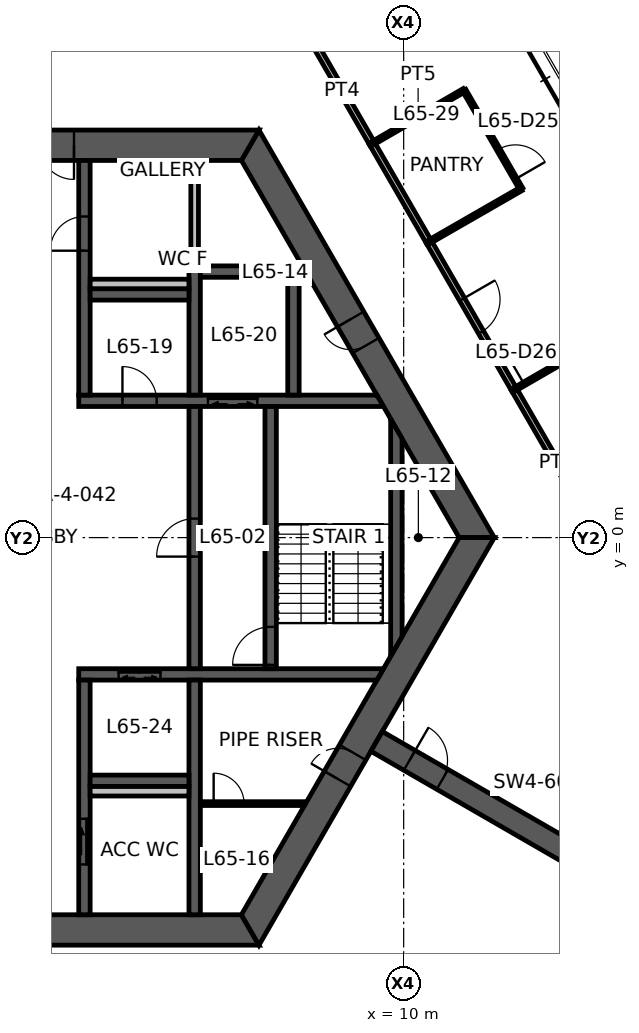
"""IFC4 building model, lengths in metres.
Left out: names, types, materials, properties, quantities, classifications, styles, units other than length and angle.
Written with IfcOpenShell. Run it as: python <this file> out.ifc"""

import sys

from ifc_helpers import new_model, si_unit, direction, frame, frame_2d, origin, place, context, subcontext, project, spatial, polyline, rectangle, outline, extrude, element, fill, save


model = new_model("IFC4")
c1 = context("Model", 3, precision=1e-05, world=origin(), true_north=direction((0.0, 1.0)))
c2 = subcontext(c1, "Body", "Model", "MODEL_VIEW")
j1 = project(units=[si_unit("LENGTHUNIT", "METRE"), si_unit("PLANEANGLEUNIT", "RADIAN")], contexts=[c1])
p1 = place(None, origin())
s1 = spatial("IfcSite", under=j1, at=p1, CompositionType="ELEMENT")
p2 = place(p1, origin())
s2 = spatial("IfcBuilding", under=s1, at=p2, CompositionType="ELEMENT")
p3 = place(p2, frame((0.0, 0.0, 259.6)))
s3 = spatial("IfcBuildingStorey", under=s2, at=p3, CompositionType="ELEMENT", Elevation=259.6)
p4 = place(p3, frame((11.922, 0.0, 0.0), z_axis=(0.0, 0.0, 1.0), x_axis=(-0.500004296715, 0.866022923061, 0.0)))
e1 = element("IfcWall", 1, at=p4, inside=s3, PredefinedType="SHEAR", context=c2, shape_type="SweptSolid", body=[
    extrude(outline(polyline([(-0.231, -0.4), (5.835, -0.4), (6.635, -0.4), (12.153, -0.4), (11.691, 0.4), (6.635, 0.4), (5.835, 0.4), (0.231, 0.4), (-0.231, -0.4)])), origin(), (0.0, 0.0, 1.0), 3.9),
])
p5 = place(p4, frame((5.835, 0.0, 0.0)))
e2 = element("IfcOpeningElement", 2, at=p5, cuts=e1, PredefinedType="OPENING", context=c2, shape_type="SweptSolid", body=[
    extrude(rectangle(XDim=0.8, YDim=2.1, at=frame_2d((0.4, 1.05))), frame((0.0, 0.41, 0.0), z_axis=(0.0, -1.0, 0.0), x_axis=(1.0, 0.0, 0.0)), (0.0, 0.0, 1.0), 0.82),
])
p6 = place(p3, frame((5.961, 10.325, 0.0), z_axis=(0.0, 0.0, 1.0), x_axis=(-1.0, 0.0, 0.0)))
e3 = element("IfcWall", 3, at=p6, inside=s3, PredefinedType="SHEAR", context=c2, shape_type="SweptSolid", body=[
    extrude(outline(polyline([(-0.231, -0.4), (4.636, -0.4), (5.536, -0.4), (6.386, -0.4), (7.286, -0.4), (12.153, -0.4), (11.691, 0.4), (7.286, 0.4), (6.386, 0.4), (5.536, 0.4), (4.636, 0.4), (0.231, 0.4), (-0.231, -0.4)])), origin(), (0.0, 0.0, 1.0), 3.9),
])
p7 = place(p6, frame((6.386, 0.0, 0.0)))
e4 = element("IfcOpeningElement", 4, at=p7, cuts=e3, PredefinedType="OPENING", context=c2, shape_type="SweptSolid", body=[
    extrude(rectangle(XDim=0.9, YDim=2.1, at=frame_2d((0.45, 1.05))), frame((0.0, 0.41, 0.0), z_axis=(0.0, -1.0, 0.0), x_axis=(1.0, 0.0, 0.0)), (0.0, 0.0, 1.0), 0.82),
])
p8 = place(p6, frame((4.636, 0.0, 0.0)))
e5 = element("IfcOpeningElement", 5, at=p8, cuts=e3, PredefinedType="OPENING", context=c2, shape_type="SweptSolid", body=[
    extrude(rectangle(XDim=0.9, YDim=2.1, at=frame_2d((0.45, 1.05))), frame((0.0, 0.41, 0.0), z_axis=(0.0, -1.0, 0.0), x_axis=(1.0, 0.0, 0.0)), (0.0, 0.0, 1.0), 0.82),
])
p9 = place(p3, frame((-5.961, -10.325, 0.0), z_axis=(0.0, 0.0, 1.0), x_axis=(1.0, 0.0, 0.0)))
e6 = element("IfcWall", 6, at=p9, inside=s3, PredefinedType="SHEAR", context=c2, shape_type="SweptSolid", body=[
    extrude(outline(polyline([(-0.231, -0.4), (5.461, -0.4), (6.461, -0.4), (12.153, -0.4), (11.691, 0.4), (6.461, 0.4), (5.461, 0.4), (0.231, 0.4), (-0.231, -0.4)])), origin(), (0.0, 0.0, 1.0), 3.9),
])
p10 = place(p9, frame((5.461, 0.0, 0.0)))
e7 = element("IfcOpeningElement", 7, at=p10, cuts=e6, PredefinedType="OPENING", context=c2, shape_type="SweptSolid", body=[
    extrude(rectangle(XDim=1.0, YDim=2.1, at=frame_2d((0.5, 1.05))), frame((0.0, 0.41, 0.0), z_axis=(0.0, -1.0, 0.0), x_axis=(1.0, 0.0, 0.0)), (0.0, 0.0, 1.0), 0.82),
])
p11 = place(p3, frame((5.961, -10.325, 0.0), z_axis=(0.0, 0.0, 1.0), x_axis=(0.500004296715, 0.866022923061, 0.0)))
e8 = element("IfcWall", 8, at=p11, inside=s3, PredefinedType="SHEAR", context=c2, shape_type="SweptSolid", body=[
    extrude(outline(polyline([(-0.231, -0.4), (4.594, -0.4), (5.394, -0.4), (12.153, -0.4), (11.691, 0.4), (5.394, 0.4), (4.594, 0.4), (0.231, 0.4), (-0.231, -0.4)])), origin(), (0.0, 0.0, 1.0), 3.9),
])
p12 = place(p11, frame((4.594, 0.0, 0.0)))
e9 = element("IfcOpeningElement", 9, at=p12, cuts=e8, PredefinedType="OPENING", context=c2, shape_type="SweptSolid", body=[
    extrude(rectangle(XDim=0.8, YDim=2.1, at=frame_2d((0.4, 1.05))), frame((0.0, 0.41, 0.0), z_axis=(0.0, -1.0, 0.0), x_axis=(1.0, 0.0, 0.0)), (0.0, 0.0, 1.0), 0.82),
])
p13 = place(p3, frame((9.288, -5.363, 0.0), z_axis=(0.0, 0.0, 1.0), x_axis=(0.866031736626, -0.499989031036, 0.0)))
e10 = element("IfcWall", 10, at=p13, inside=s3, PredefinedType="SHEAR", context=c2, shape_type="SweptSolid", body=[
    extrude(rectangle(XDim=7.796, YDim=0.6, at=frame_2d((3.898, 0.0))), origin(), (0.0, 0.0, 1.0), 3.9),
])
p14 = place(p13, frame((1.0, 0.0, 0.0)))
e11 = element("IfcOpeningElement", 11, at=p14, cuts=e10, PredefinedType="OPENING", context=c2, shape_type="SweptSolid", body=[
    extrude(rectangle(XDim=1.0, YDim=2.1, at=frame_2d((0.5, 1.05))), frame((0.0, 0.31, 0.0), z_axis=(0.0, -1.0, 0.0), x_axis=(1.0, 0.0, 0.0)), (0.0, 0.0, 1.0), 0.62),
])
p15 = place(p3, frame((1.45, 3.6, 0.0), z_axis=(0.0, 0.0, 1.0), x_axis=(1.0, 0.0, 0.0)))
e12 = element("IfcWall", 12, at=p15, inside=s3, PredefinedType="SHEAR", context=c2, shape_type="SweptSolid", body=[
    extrude(outline(polyline([(0.0, -0.15), (1.15, -0.15), (2.05, -0.15), (3.4, -0.15), (4.7, -0.15), (8.019, -0.15), (7.845, 0.15), (4.7, 0.15), (3.4, 0.15), (2.05, 0.15), (1.15, 0.15), (0.0, 0.15), (0.0, -0.15)])), origin(), (0.0, 0.0, 1.0), 3.9),
])
p16 = place(p15, frame((1.15, 0.0, 0.0)))
e13 = element("IfcOpeningElement", 13, at=p16, cuts=e12, PredefinedType="OPENING", context=c2, shape_type="SweptSolid", body=[
    extrude(rectangle(XDim=0.9, YDim=2.1, at=frame_2d((0.45, 1.05))), frame((0.0, 0.16, 0.0), z_axis=(0.0, -1.0, 0.0), x_axis=(1.0, 0.0, 0.0)), (0.0, 0.0, 1.0), 0.32),
])
p17 = place(p15, frame((3.4, 0.0, 0.0)))
e14 = element("IfcOpeningElement", 14, at=p17, cuts=e12, PredefinedType="OPENING", context=c2, shape_type="SweptSolid", body=[
    extrude(rectangle(XDim=1.3, YDim=2.1, at=frame_2d((0.65, 1.05))), frame((0.0, 0.16, 0.0), z_axis=(0.0, -1.0, 0.0), x_axis=(1.0, 0.0, 0.0)), (0.0, 0.0, 1.0), 0.32),
])
p18 = place(p3, frame((1.45, -3.6, 0.0), z_axis=(0.0, 0.0, 1.0), x_axis=(1.0, 0.0, 0.0)))
e15 = element("IfcWall", 15, at=p18, inside=s3, PredefinedType="SHEAR", context=c2, shape_type="SweptSolid", body=[
    extrude(outline(polyline([(0.0, -0.15), (1.05, -0.15), (2.15, -0.15), (7.845, -0.15), (8.019, 0.15), (2.15, 0.15), (1.05, 0.15), (0.0, 0.15), (0.0, -0.15)])), origin(), (0.0, 0.0, 1.0), 3.9),
])
p19 = place(p18, frame((1.05, 0.0, 0.0)))
e16 = element("IfcOpeningElement", 16, at=p19, cuts=e15, PredefinedType="OPENING", context=c2, shape_type="SweptSolid", body=[
    extrude(rectangle(XDim=1.1, YDim=2.1, at=frame_2d((0.55, 1.05))), frame((0.0, 0.16, 0.0), z_axis=(0.0, -1.0, 0.0), x_axis=(1.0, 0.0, 0.0)), (0.0, 0.0, 1.0), 0.32),
])
p20 = place(p3, frame((1.6, 3.75, 0.0), z_axis=(0.0, 0.0, 1.0), x_axis=(0.0, 1.0, 0.0)))
e17 = element("IfcWall", 17, at=p20, inside=s3, PredefinedType="SHEAR", context=c2, shape_type="SweptSolid", body=[
    extrude(rectangle(XDim=6.175, YDim=0.3, at=frame_2d((3.087, 0.0))), origin(), (0.0, 0.0, 1.0), 3.9),
])
p21 = place(p20, frame((3.8, 0.0, 0.0)))
e18 = element("IfcOpeningElement", 18, at=p21, cuts=e17, PredefinedType="OPENING", context=c2, shape_type="SweptSolid", body=[
    extrude(rectangle(XDim=0.9, YDim=2.1, at=frame_2d((0.45, 1.05))), frame((0.0, 0.16, 0.0), z_axis=(0.0, -1.0, 0.0), x_axis=(1.0, 0.0, 0.0)), (0.0, 0.0, 1.0), 0.32),
])
p22 = place(p3, frame((1.6, -3.75, 0.0), z_axis=(0.0, 0.0, 1.0), x_axis=(0.0, -1.0, 0.0)))
e19 = element("IfcWall", 19, at=p22, inside=s3, PredefinedType="SHEAR", context=c2, shape_type="SweptSolid", body=[
    extrude(rectangle(XDim=6.175, YDim=0.3, at=frame_2d((3.087, 0.0))), origin(), (0.0, 0.0, 1.0), 3.9),
])
p23 = place(p22, frame((3.65, 0.0, 0.0)))
e20 = element("IfcOpeningElement", 20, at=p23, cuts=e19, PredefinedType="OPENING", context=c2, shape_type="SweptSolid", body=[
    extrude(rectangle(XDim=1.2, YDim=2.1, at=frame_2d((0.6, 1.05))), frame((0.0, 0.16, 0.0), z_axis=(0.0, -1.0, 0.0), x_axis=(1.0, 0.0, 0.0)), (0.0, 0.0, 1.0), 0.32),
])
p24 = place(p3, frame((4.5, -3.45, 0.0), z_axis=(0.0, 0.0, 1.0), x_axis=(0.0, 1.0, 0.0)))
e21 = element("IfcWall", 21, at=p24, inside=s3, PredefinedType="SHEAR", context=c2, shape_type="SweptSolid", body=[
    extrude(rectangle(XDim=6.9, YDim=0.3, at=frame_2d((3.45, 0.0))), origin(), (0.0, 0.0, 1.0), 3.9),
])
p25 = place(p24, frame((2.95, 0.0, 0.0)))
e22 = element("IfcOpeningElement", 22, at=p25, cuts=e21, PredefinedType="OPENING", context=c2, shape_type="SweptSolid", body=[
    extrude(rectangle(XDim=1.0, YDim=2.1, at=frame_2d((0.5, 1.05))), frame((0.0, 0.16, 0.0), z_axis=(0.0, -1.0, 0.0), x_axis=(1.0, 0.0, 0.0)), (0.0, 0.0, 1.0), 0.32),
])
p26 = place(p3, frame((6.5, -3.45, 0.0), z_axis=(0.0, 0.0, 1.0), x_axis=(0.0, 1.0, 0.0)))
e23 = element("IfcWall", 23, at=p26, inside=s3, PredefinedType="SHEAR", context=c2, shape_type="SweptSolid", body=[
    extrude(rectangle(XDim=6.9, YDim=0.3, at=frame_2d((3.45, 0.0))), origin(), (0.0, 0.0, 1.0), 3.9),
])
p27 = place(p26, frame((0.1, 0.0, 0.0)))
e24 = element("IfcOpeningElement", 24, at=p27, cuts=e23, PredefinedType="OPENING", context=c2, shape_type="SweptSolid", body=[
    extrude(rectangle(XDim=1.0, YDim=2.1, at=frame_2d((0.5, 1.05))), frame((0.0, 0.16, 0.0), z_axis=(0.0, -1.0, 0.0), x_axis=(1.0, 0.0, 0.0)), (0.0, 0.0, 1.0), 0.32),
])
p28 = place(p3, frame((4.5, 3.75, 0.0), z_axis=(0.0, 0.0, 1.0), x_axis=(0.0, 1.0, 0.0)))
e25 = element("IfcWall", 25, at=p28, inside=s3, PredefinedType="SHEAR", context=c2, shape_type="SweptSolid", body=[
    extrude(rectangle(XDim=3.4, YDim=0.3, at=frame_2d((1.7, 0.0))), origin(), (0.0, 0.0, 1.0), 3.9),
])
p29 = place(p3, frame((4.5, -3.75, 0.0), z_axis=(0.0, 0.0, 1.0), x_axis=(0.0, -1.0, 0.0)))
e26 = element("IfcWall", 26, at=p29, inside=s3, PredefinedType="SHEAR", context=c2, shape_type="SweptSolid", body=[
    extrude(rectangle(XDim=6.175, YDim=0.3, at=frame_2d((3.087, 0.0))), origin(), (0.0, 0.0, 1.0), 3.9),
])
for number, where, z_axis, x_axis in (
    (27, (1.75, 6.4, 0.0), (0.0, 0.0, 1.0), (1.0, 0.0, 0.0)),
    (28, (1.75, -6.4, 0.0), (0.0, 0.0, 1.0), (1.0, 0.0, 0.0)),
    (29, (4.65, 7.0, 0.0), (0.0, 0.0, 1.0), (1.0, 0.0, 0.0)),
):
    element("IfcWall", number, at=place(p3, frame(where, z_axis=z_axis, x_axis=x_axis)), inside=s3, PredefinedType="SHEAR", context=c2, shape_type="SweptSolid", body=[
        extrude(rectangle(XDim=2.6, YDim=0.3, at=frame_2d((1.3, 0.0))), origin(), (0.0, 0.0, 1.0), 3.9),
    ])
p30 = place(p3, frame((7.1, 3.75, 0.0), z_axis=(0.0, 0.0, 1.0), x_axis=(0.0, 1.0, 0.0)))
e30 = element("IfcWall", 30, at=p30, inside=s3, PredefinedType="SHEAR", context=c2, shape_type="SweptSolid", body=[
    extrude(rectangle(XDim=3.1, YDim=0.3, at=frame_2d((1.55, 0.0))), origin(), (0.0, 0.0, 1.0), 3.9),
])
p31 = place(p3, frame((9.808, -2.862, 0.0), z_axis=(0.0, 0.0, 1.0), x_axis=(0.0, 1.0, 0.0)))
e31 = element("IfcWall", 31, at=p31, inside=s3, PredefinedType="SHEAR", context=c2, shape_type="SweptSolid", body=[
    extrude(outline(polyline([(0.26, -0.15), (5.465, -0.15), (5.984, 0.15), (-0.26, 0.15), (0.26, -0.15)])), origin(), (0.0, 0.0, 1.0), 3.9),
])
p32 = place(p3, frame((4.5, 7.15, 0.0), z_axis=(0.0, 0.0, 1.0), x_axis=(0.0, 1.0, 0.0)))
e32 = element("IfcWall", 32, at=p32, inside=s3, PredefinedType="STANDARD", context=c2, shape_type="SweptSolid", body=[
    extrude(rectangle(XDim=2.775, YDim=0.2, at=frame_2d((1.388, 0.0))), origin(), (0.0, 0.0, 1.0), 3.9),
])
for number, where, z_axis, x_axis in (
    (33, (1.75, 6.675, 0.0), (0.0, 0.0, 1.0), (1.0, 0.0, 0.0)),
    (34, (1.75, -6.675, 0.0), (0.0, 0.0, 1.0), (1.0, 0.0, 0.0)),
):
    element("IfcWall", number, at=place(p3, frame(where, z_axis=z_axis, x_axis=x_axis)), inside=s3, PredefinedType="PLUMBINGWALL", context=c2, shape_type="SweptSolid", body=[
        extrude(rectangle(XDim=2.6, YDim=0.25, at=frame_2d((1.3, 0.0))), origin(), (0.0, 0.0, 1.0), 3.9),
    ])
p33 = place(p3, frame((4.65, -7.0, 0.0), z_axis=(0.0, 0.0, 1.0), x_axis=(1.0, 0.0, 0.0)))
e35 = element("IfcWall", 35, at=p33, inside=s3, PredefinedType="PARTITIONING", context=c2, shape_type="SweptSolid", body=[
    extrude(outline(polyline([(0.0, -0.05), (0.35, -0.05), (1.15, -0.05), (2.74, -0.05), (2.769, 0.0), (2.775, 0.05), (1.15, 0.05), (0.35, 0.05), (0.0, 0.05), (0.0, -0.05)])), origin(), (0.0, 0.0, 1.0), 2.95),
])
p34 = place(p33, frame((0.35, 0.0, 0.0)))
e36 = element("IfcOpeningElement", 36, at=p34, cuts=e35, PredefinedType="OPENING", context=c2, shape_type="SweptSolid", body=[
    extrude(rectangle(XDim=0.8, YDim=2.1, at=frame_2d((0.4, 1.05))), frame((0.0, 0.06, 0.0), z_axis=(0.0, -1.0, 0.0), x_axis=(1.0, 0.0, 0.0)), (0.0, 0.0, 1.0), 0.12),
])
p35 = place(p3, frame((9.164, 10.377, 0.0), z_axis=(0.0, 0.0, 1.0), x_axis=(0.500038395149, -0.8660032352, 0.0)))
e37 = element("IfcWall", 37, at=p35, inside=s3, PredefinedType="PARTITIONING", context=c2, shape_type="SweptSolid", body=[
    extrude(rectangle(XDim=3.01, YDim=0.15, at=frame_2d((1.505, 0.0))), origin(), (0.0, 0.0, 1.0), 2.95),
])
p36 = place(p3, frame((12.903, 3.902, 0.0), z_axis=(0.0, 0.0, 1.0), x_axis=(0.499964488425, -0.866045905431, 0.0)))
e38 = element("IfcWall", 38, at=p36, inside=s3, PredefinedType="PARTITIONING", context=c2, shape_type="SweptSolid", body=[
    extrude(rectangle(XDim=4.482, YDim=0.15, at=frame_2d((2.241, 0.0))), origin(), (0.0, 0.0, 1.0), 2.95),
])
p37 = place(p3, frame((7.578, 13.125, 0.0), z_axis=(0.0, 0.0, 1.0), x_axis=(0.499992528944, -0.866029717158, 0.0)))
e39 = element("IfcWall", 39, at=p37, inside=s3, PredefinedType="PARTITIONING", context=c2, shape_type="SweptSolid", body=[
    extrude(rectangle(XDim=3.182, YDim=0.15, at=frame_2d((1.591, 0.0))), origin(), (0.0, 0.0, 1.0), 2.95),
])
p38 = place(p3, frame((10.664, 7.779, 0.0), z_axis=(0.0, 0.0, 1.0), x_axis=(0.500001951578, -0.866024277037, 0.0)))
e40 = element("IfcWall", 40, at=p38, inside=s3, PredefinedType="PARTITIONING", context=c2, shape_type="SweptSolid", body=[
    extrude(rectangle(XDim=4.486, YDim=0.15, at=frame_2d((2.243, 0.0))), origin(), (0.0, 0.0, 1.0), 2.95),
])
p39 = place(p38, frame((1.743, 0.0, 0.0)))
e41 = element("IfcOpeningElement", 41, at=p39, cuts=e40, PredefinedType="OPENING", context=c2, shape_type="SweptSolid", body=[
    extrude(rectangle(XDim=1.0, YDim=2.1, at=frame_2d((0.5, 1.05))), frame((0.0, 0.085, 0.0), z_axis=(0.0, -1.0, 0.0), x_axis=(1.0, 0.0, 0.0)), (0.0, 0.0, 1.0), 0.17),
])
p40 = place(p3, frame((9.169, 10.369, 0.0), z_axis=(0.0, 0.0, 1.0), x_axis=(0.865255114713, 0.501331812737, 0.0)))
e42 = element("IfcWall", 42, at=p40, inside=s3, PredefinedType="PARTITIONING", context=c2, shape_type="SweptSolid", body=[
    extrude(rectangle(XDim=2.8, YDim=0.1, at=frame_2d((1.4, 0.0))), origin(), (0.0, 0.0, 1.0), 2.95),
])
p41 = place(p3, frame((11.592, 11.773, 0.0), z_axis=(0.0, 0.0, 1.0), x_axis=(0.499990139034, -0.866031096941, 0.0)))
e43 = element("IfcWall", 43, at=p41, inside=s3, PredefinedType="PARTITIONING", context=c2, shape_type="SweptSolid", body=[
    extrude(rectangle(XDim=3.0, YDim=0.1, at=frame_2d((1.5, 0.0))), origin(), (0.0, 0.0, 1.0), 2.95),
])
p42 = place(p41, frame((1.8, 0.0, 0.0)))
e44 = element("IfcOpeningElement", 44, at=p42, cuts=e43, PredefinedType="OPENING", context=c2, shape_type="SweptSolid", body=[
    extrude(rectangle(XDim=0.9, YDim=2.1, at=frame_2d((0.45, 1.05))), frame((0.0, 0.06, 0.0), z_axis=(0.0, -1.0, 0.0), x_axis=(1.0, 0.0, 0.0)), (0.0, 0.0, 1.0), 0.12),
])
p43 = place(p3, frame((13.092, 9.175, 0.0), z_axis=(0.0, 0.0, 1.0), x_axis=(-0.866855433567, -0.498559582492, 0.0)))
e45 = element("IfcWall", 45, at=p43, inside=s3, PredefinedType="PARTITIONING", context=c2, shape_type="SweptSolid", body=[
    extrude(rectangle(XDim=2.8, YDim=0.1, at=frame_2d((1.4, 0.0))), origin(), (0.0, 0.0, 1.0), 2.95),
])
p44 = place(p3, frame((12.907, 3.894, 0.0), z_axis=(0.0, 0.0, 1.0), x_axis=(0.86555176604, 0.500819468776, 0.0)))
e46 = element("IfcWall", 46, at=p44, inside=s3, PredefinedType="PARTITIONING", context=c2, shape_type="SweptSolid", body=[
    extrude(rectangle(XDim=4.706, YDim=0.1, at=frame_2d((2.353, 0.0))), origin(), (0.0, 0.0, 1.0), 2.95),
])
p45 = place(p44, frame((0.3, 0.0, 0.0)))
e47 = element("IfcOpeningElement", 47, at=p45, cuts=e46, PredefinedType="OPENING", context=c2, shape_type="SweptSolid", body=[
    extrude(rectangle(XDim=0.9, YDim=2.1, at=frame_2d((0.45, 1.05))), frame((0.0, 0.06, 0.0), z_axis=(0.0, -1.0, 0.0), x_axis=(1.0, 0.0, 0.0)), (0.0, 0.0, 1.0), 0.12),
])
p46 = place(p8, origin())
e48 = element("IfcDoor", 48, at=p46, inside=s3, OperationType="SINGLE_SWING_LEFT", PredefinedType="DOOR", context=c2, shape_type="SweptSolid", body=[
    extrude(rectangle(XDim=0.9, YDim=2.1, at=frame_2d((0.45, 1.05))), frame((0.0, 0.025, 0.0), z_axis=(0.0, -1.0, 0.0), x_axis=(1.0, 0.0, 0.0)), (0.0, 0.0, 1.0), 0.05),
])
fill(e5, e48)
p47 = place(p5, origin())
e49 = element("IfcDoor", 49, at=p47, inside=s3, OperationType="SINGLE_SWING_RIGHT", PredefinedType="DOOR", context=c2, shape_type="SweptSolid", body=[
    extrude(rectangle(XDim=0.8, YDim=2.1, at=frame_2d((0.4, 1.05))), frame((0.0, 0.025, 0.0), z_axis=(0.0, -1.0, 0.0), x_axis=(1.0, 0.0, 0.0)), (0.0, 0.0, 1.0), 0.05),
])
fill(e2, e49)
p48 = place(p12, origin())
e50 = element("IfcDoor", 50, at=p48, inside=s3, OperationType="SINGLE_SWING_LEFT", PredefinedType="DOOR", context=c2, shape_type="SweptSolid", body=[
    extrude(rectangle(XDim=0.8, YDim=2.1, at=frame_2d((0.4, 1.05))), frame((0.0, 0.025, 0.0), z_axis=(0.0, -1.0, 0.0), x_axis=(1.0, 0.0, 0.0)), (0.0, 0.0, 1.0), 0.05),
])
fill(e9, e50)
p49 = place(p25, origin())
e51 = element("IfcDoor", 51, at=p49, inside=s3, OperationType="SINGLE_SWING_LEFT", PredefinedType="DOOR", context=c2, shape_type="SweptSolid", body=[
    extrude(rectangle(XDim=1.0, YDim=2.1, at=frame_2d((0.5, 1.05))), frame((0.0, 0.025, 0.0), z_axis=(0.0, -1.0, 0.0), x_axis=(1.0, 0.0, 0.0)), (0.0, 0.0, 1.0), 0.05),
])
fill(e22, e51)
p50 = place(p27, origin())
e52 = element("IfcDoor", 52, at=p50, inside=s3, OperationType="SINGLE_SWING_LEFT", PredefinedType="DOOR", context=c2, shape_type="SweptSolid", body=[
    extrude(rectangle(XDim=1.0, YDim=2.1, at=frame_2d((0.5, 1.05))), frame((0.0, 0.025, 0.0), z_axis=(0.0, -1.0, 0.0), x_axis=(1.0, 0.0, 0.0)), (0.0, 0.0, 1.0), 0.05),
])
fill(e24, e52)
p51 = place(p21, origin())
e53 = element("IfcDoor", 53, at=p51, inside=s3, OperationType="SINGLE_SWING_LEFT", PredefinedType="DOOR", context=c2, shape_type="SweptSolid", body=[
    extrude(rectangle(XDim=0.9, YDim=2.1, at=frame_2d((0.45, 1.05))), frame((0.0, 0.025, 0.0), z_axis=(0.0, -1.0, 0.0), x_axis=(1.0, 0.0, 0.0)), (0.0, 0.0, 1.0), 0.05),
])
fill(e18, e53)
p52 = place(p23, origin())
e54 = element("IfcDoor", 54, at=p52, inside=s3, OperationType="SLIDING_TO_LEFT", PredefinedType="DOOR", context=c2, shape_type="SweptSolid", body=[
    extrude(rectangle(XDim=1.2, YDim=2.1, at=frame_2d((0.6, 1.05))), frame((0.0, 0.025, 0.0), z_axis=(0.0, -1.0, 0.0), x_axis=(1.0, 0.0, 0.0)), (0.0, 0.0, 1.0), 0.05),
])
fill(e20, e54)
p53 = place(p16, origin())
e55 = element("IfcDoor", 55, at=p53, inside=s3, OperationType="SINGLE_SWING_LEFT", PredefinedType="DOOR", context=c2, shape_type="SweptSolid", body=[
    extrude(rectangle(XDim=0.9, YDim=2.1, at=frame_2d((0.45, 1.05))), frame((0.0, 0.025, 0.0), z_axis=(0.0, -1.0, 0.0), x_axis=(1.0, 0.0, 0.0)), (0.0, 0.0, 1.0), 0.05),
])
fill(e13, e55)
p54 = place(p14, origin())
e56 = element("IfcDoor", 56, at=p54, inside=s3, OperationType="SINGLE_SWING_LEFT", PredefinedType="DOOR", context=c2, shape_type="SweptSolid", body=[
    extrude(rectangle(XDim=1.0, YDim=2.1, at=frame_2d((0.5, 1.05))), frame((0.0, 0.025, 0.0), z_axis=(0.0, -1.0, 0.0), x_axis=(1.0, 0.0, 0.0)), (0.0, 0.0, 1.0), 0.05),
])
fill(e11, e56)
p55 = place(p34, origin())
e57 = element("IfcDoor", 57, at=p55, inside=s3, OperationType="SINGLE_SWING_LEFT", PredefinedType="DOOR", context=c2, shape_type="SweptSolid", body=[
    extrude(rectangle(XDim=0.8, YDim=2.1, at=frame_2d((0.4, 1.05))), frame((0.0, 0.025, 0.0), z_axis=(0.0, -1.0, 0.0), x_axis=(1.0, 0.0, 0.0)), (0.0, 0.0, 1.0), 0.05),
])
fill(e36, e57)
p56 = place(p39, origin())
e58 = element("IfcDoor", 58, at=p56, inside=s3, OperationType="SINGLE_SWING_LEFT", PredefinedType="DOOR", context=c2, shape_type="SweptSolid", body=[
    extrude(rectangle(XDim=1.0, YDim=2.1, at=frame_2d((0.5, 1.05))), frame((0.0, 0.025, 0.0), z_axis=(0.0, -1.0, 0.0), x_axis=(1.0, 0.0, 0.0)), (0.0, 0.0, 1.0), 0.05),
])
fill(e41, e58)
p57 = place(p42, origin())
e59 = element("IfcDoor", 59, at=p57, inside=s3, OperationType="SINGLE_SWING_RIGHT", PredefinedType="DOOR", context=c2, shape_type="SweptSolid", body=[
    extrude(rectangle(XDim=0.9, YDim=2.1, at=frame_2d((0.45, 1.05))), frame((0.0, 0.025, 0.0), z_axis=(0.0, -1.0, 0.0), x_axis=(1.0, 0.0, 0.0)), (0.0, 0.0, 1.0), 0.05),
])
fill(e44, e59)
p58 = place(p45, origin())
e60 = element("IfcDoor", 60, at=p58, inside=s3, OperationType="SINGLE_SWING_LEFT", PredefinedType="DOOR", context=c2, shape_type="SweptSolid", body=[
    extrude(rectangle(XDim=0.9, YDim=2.1, at=frame_2d((0.45, 1.05))), frame((0.0, 0.025, 0.0), z_axis=(0.0, -1.0, 0.0), x_axis=(1.0, 0.0, 0.0)), (0.0, 0.0, 1.0), 0.05),
])
fill(e47, e60)
p59 = place(p19, origin())
e61 = element("IfcDoor", 61, at=p59, inside=s3, OperationType="DOUBLE_DOOR_SLIDING", PredefinedType="DOOR", context=c2, shape_type="SweptSolid", body=[
    extrude(rectangle(XDim=1.1, YDim=2.1, at=frame_2d((0.55, 1.05))), frame((0.0, 0.025, 0.0), z_axis=(0.0, -1.0, 0.0), x_axis=(1.0, 0.0, 0.0)), (0.0, 0.0, 1.0), 0.05),
])
fill(e16, e61)
p60 = place(p17, origin())
e62 = element("IfcDoor", 62, at=p60, inside=s3, OperationType="DOUBLE_DOOR_SLIDING", PredefinedType="DOOR", context=c2, shape_type="SweptSolid", body=[
    extrude(rectangle(XDim=1.3, YDim=2.1, at=frame_2d((0.65, 1.05))), frame((0.0, 0.025, 0.0), z_axis=(0.0, -1.0, 0.0), x_axis=(1.0, 0.0, 0.0)), (0.0, 0.0, 1.0), 0.05),
])
fill(e14, e62)
save(model, sys.argv[1])
